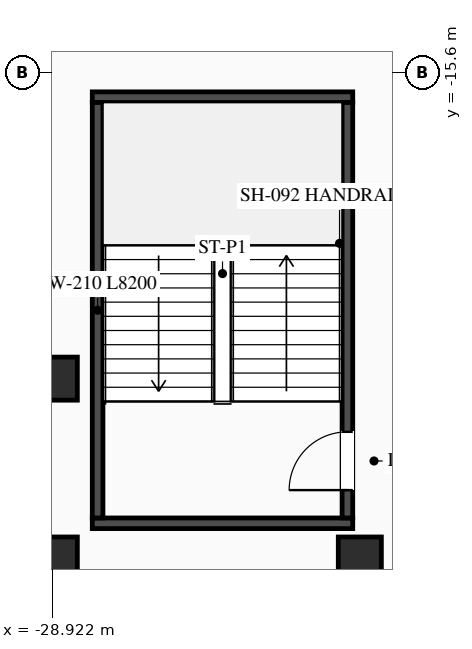
"""IFC4 building model, lengths in metres.
Left out: names, types, materials, properties, quantities, classifications, styles, units other than length and angle.
Written with IfcOpenShell. Run it as: python <this file> out.ifc"""

import sys

from ifc_helpers import new_model, si_unit, direction, frame, frame_2d, origin, origin_2d, place, context, subcontext, project, spatial, rectangle, i_section, extrude, element, fill, save


model = new_model("IFC4")
c1 = context("Model", 3, precision=1e-05, world=origin(), true_north=direction((0.0, 1.0)))
c2 = subcontext(c1, "Body", "Model", "MODEL_VIEW")
j1 = project(units=[si_unit("LENGTHUNIT", "METRE"), si_unit("PLANEANGLEUNIT", "RADIAN")], contexts=[c1])
p1 = place(None, origin())
s1 = spatial("IfcSite", under=j1, at=p1, CompositionType="ELEMENT")
p2 = place(p1, origin())
s2 = spatial("IfcBuilding", under=s1, at=p2, CompositionType="ELEMENT")
p3 = place(p2, frame((0.0, 0.0, 5.1)))
s3 = spatial("IfcBuildingStorey", under=s2, at=p3, CompositionType="ELEMENT", Elevation=5.1)
for number, where, z_axis, x_axis in (
    (1, (-28.13, -24.505, 0.0), (0.0, 0.0, 1.0), (1.0, 0.0, 0.0)),
    (2, (-28.13, -16.095, 0.0), (0.0, 0.0, 1.0), (1.0, 0.0, 0.0)),
):
    element("IfcWall", number, at=place(p3, frame(where, z_axis=z_axis, x_axis=x_axis)), inside=s3, PredefinedType="SHEAR", context=c2, shape_type="SweptSolid", body=[
        extrude(rectangle(XDim=5.14, YDim=0.21, at=frame_2d((2.57, 0.0))), origin(), (0.0, 0.0, 1.0), 4.25),
    ])
p4 = place(p3, frame((-28.025, -24.4, 0.0), z_axis=(0.0, 0.0, 1.0), x_axis=(0.0, 1.0, 0.0)))
e3 = element("IfcWall", 3, at=p4, inside=s3, PredefinedType="SHEAR", context=c2, shape_type="SweptSolid", body=[
    extrude(rectangle(XDim=8.2, YDim=0.21, at=frame_2d((4.1, 0.0))), origin(), (0.0, 0.0, 1.0), 4.25),
])
p5 = place(p3, frame((-23.095, -24.4, 0.0), z_axis=(0.0, 0.0, 1.0), x_axis=(0.0, 1.0, 0.0)))
e4 = element("IfcWall", 4, at=p5, inside=s3, PredefinedType="SHEAR", context=c2, shape_type="SweptSolid", body=[
    extrude(rectangle(XDim=8.2, YDim=0.21, at=frame_2d((4.1, 0.0))), origin(), (0.0, 0.0, 1.0), 4.25),
])
p6 = place(p5, frame((0.55, 0.0, 0.0)))
e5 = element("IfcOpeningElement", 5, at=p6, cuts=e4, PredefinedType="OPENING", context=c2, shape_type="SweptSolid", body=[
    extrude(rectangle(XDim=1.15, YDim=2.1, at=frame_2d((0.575, 1.05))), frame((0.0, 0.115, 0.0), z_axis=(0.0, -1.0, 0.0), x_axis=(1.0, 0.0, 0.0)), (0.0, 0.0, 1.0), 0.23),
])
for number, where, z_axis, x_axis in (
    (6, (-28.85, -21.65, 0.0), (0.0, 0.0, 1.0), (1.0, 0.0, 0.0)),
    (7, (-28.85, -25.2, 0.0), (0.0, 0.0, 1.0), (1.0, 0.0, 0.0)),
    (8, (-22.85, -25.2, 0.0), (0.0, 0.0, 1.0), (1.0, 0.0, 0.0)),
):
    element("IfcColumn", number, at=place(p3, frame(where, z_axis=z_axis, x_axis=x_axis)), inside=s3, PredefinedType="COLUMN", context=c2, shape_type="SweptSolid", body=[
        extrude(i_section(OverallWidth=0.85, OverallDepth=0.85, WebThickness=0.032, FlangeThickness=0.048, at=origin_2d()), origin(), (0.0, 0.0, 1.0), 4.5),
    ])
p7 = place(p6, origin())
e9 = element("IfcDoor", 9, at=p7, inside=s3, OperationType="SINGLE_SWING_LEFT", PredefinedType="DOOR", context=c2, shape_type="SweptSolid", body=[
    extrude(rectangle(XDim=1.15, YDim=2.1, at=frame_2d((0.575, 1.05))), frame((0.0, 0.025, 0.0), z_axis=(0.0, -1.0, 0.0), x_axis=(1.0, 0.0, 0.0)), (0.0, 0.0, 1.0), 0.05),
])
fill(e5, e9)
save(model, sys.argv[1])
